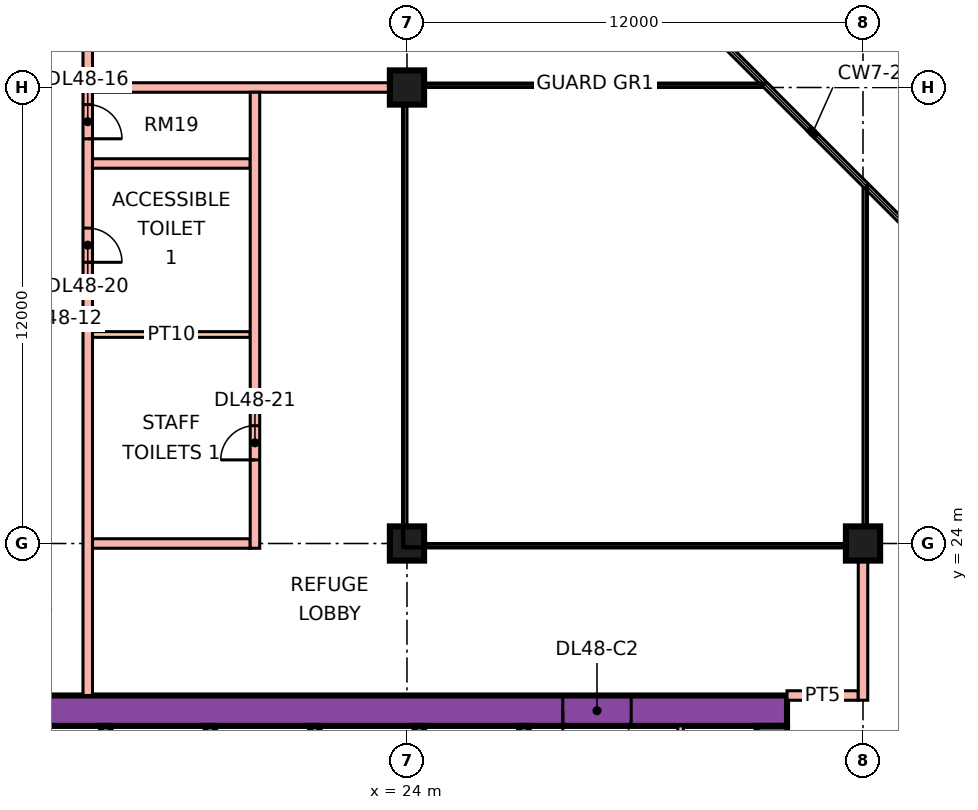
"""IFC4 building model, lengths in metres.
Left out: names, types, materials, properties, quantities, classifications, styles, units other than length and angle.
Written with IfcOpenShell. Run it as: python <this file> out.ifc"""

import sys

from ifc_helpers import new_model, si_unit, direction, frame, frame_2d, origin, origin_2d, place, context, subcontext, project, spatial, rectangle, extrude, element, fill, save


model = new_model("IFC4")
c1 = context("Model", 3, precision=1e-05, world=origin(), true_north=direction((0.0, 1.0)))
c2 = subcontext(c1, "Body", "Model", "MODEL_VIEW")
j1 = project(units=[si_unit("LENGTHUNIT", "METRE"), si_unit("PLANEANGLEUNIT", "RADIAN")], contexts=[c1])
p1 = place(None, origin())
s1 = spatial("IfcSite", under=j1, at=p1, CompositionType="ELEMENT")
p2 = place(p1, origin())
s2 = spatial("IfcBuilding", under=s1, at=p2, CompositionType="ELEMENT")
p3 = place(p2, frame((0.0, 0.0, 206.15)))
s3 = spatial("IfcBuildingStorey", under=s2, at=p3, CompositionType="ELEMENT", Elevation=206.15)
for number, where, z_axis, x_axis in (
    (1, (24.0, 24.0, 0.0), (0.0, 0.0, 1.0), (1.0, 0.0, 0.0)),
    (2, (24.0, 36.0, 0.0), (0.0, 0.0, 1.0), (1.0, 0.0, 0.0)),
    (3, (36.0, 24.0, 0.0), (0.0, 0.0, 1.0), (1.0, 0.0, 0.0)),
):
    element("IfcColumn", number, at=place(p3, frame(where, z_axis=z_axis, x_axis=x_axis)), inside=s3, PredefinedType="COLUMN", context=c2, shape_type="SweptSolid", body=[
        extrude(rectangle(XDim=0.9, YDim=0.9, at=origin_2d()), origin(), (0.0, 0.0, 1.0), 5.5),
    ])
p4 = place(p3, frame((9.0, 19.6, 0.0), z_axis=(0.0, 0.0, 1.0), x_axis=(1.0, 0.0, 0.0)))
e4 = element("IfcWall", 4, at=p4, inside=s3, PredefinedType="SHEAR", context=c2, shape_type="SweptSolid", body=[
    extrude(rectangle(XDim=25.0, YDim=0.8, at=frame_2d((12.5, 0.0))), origin(), (0.0, 0.0, 1.0), 5.5),
])
p5 = place(p4, frame((19.1, 0.0, 0.0)))
e5 = element("IfcOpeningElement", 5, at=p5, cuts=e4, PredefinedType="OPENING", context=c2, shape_type="SweptSolid", body=[
    extrude(rectangle(XDim=1.8, YDim=2.4, at=frame_2d((0.9, 1.2))), frame((0.0, 0.41, 0.0), z_axis=(0.0, -1.0, 0.0), x_axis=(1.0, 0.0, 0.0)), (0.0, 0.0, 1.0), 0.82),
])
p6 = place(p3, frame((33.6, 7.8, 0.0), z_axis=(0.0, 0.0, 1.0), x_axis=(0.0, 1.0, 0.0)))
e6 = element("IfcWall", 6, at=p6, inside=s3, PredefinedType="SHEAR", context=c2, shape_type="SweptSolid", body=[
    extrude(rectangle(XDim=11.4, YDim=0.8, at=frame_2d((5.7, 0.0))), origin(), (0.0, 0.0, 1.0), 5.5),
])
p7 = place(p6, frame((5.4, 0.0, 0.0)))
e7 = element("IfcOpeningElement", 7, at=p7, cuts=e6, PredefinedType="OPENING", context=c2, shape_type="SweptSolid", body=[
    extrude(rectangle(XDim=1.8, YDim=2.4, at=frame_2d((0.9, 1.2))), frame((0.0, 0.41, 0.0), z_axis=(0.0, -1.0, 0.0), x_axis=(1.0, 0.0, 0.0)), (0.0, 0.0, 1.0), 0.82),
])
for number, where, z_axis, x_axis in (
    (8, (16.075, 15.8, 0.0), (0.0, 0.0, 1.0), (0.0, 1.0, 0.0)),
    (9, (18.825, 15.8, 0.0), (0.0, 0.0, 1.0), (0.0, 1.0, 0.0)),
    (10, (21.575, 15.8, 0.0), (0.0, 0.0, 1.0), (0.0, 1.0, 0.0)),
    (11, (24.325, 15.8, 0.0), (0.0, 0.0, 1.0), (0.0, 1.0, 0.0)),
    (12, (27.075, 15.8, 0.0), (0.0, 0.0, 1.0), (0.0, 1.0, 0.0)),
):
    element("IfcWall", number, at=place(p3, frame(where, z_axis=z_axis, x_axis=x_axis)), inside=s3, PredefinedType="SHEAR", context=c2, shape_type="SweptSolid", body=[
        extrude(rectangle(XDim=3.4, YDim=0.25, at=frame_2d((1.7, 0.0))), origin(), (0.0, 0.0, 1.0), 5.5),
    ])
p8 = place(p3, frame((31.2, 16.0, 0.0), z_axis=(0.0, 0.0, 1.0), x_axis=(0.0, 1.0, 0.0)))
e13 = element("IfcWall", 13, at=p8, inside=s3, PredefinedType="PARTITIONING", context=c2, shape_type="SweptSolid", body=[
    extrude(rectangle(XDim=3.2, YDim=0.15, at=frame_2d((1.6, 0.0))), origin(), (0.0, 0.0, 1.0), 5.1),
])
p9 = place(p8, frame((0.5, 0.0, 0.0)))
e14 = element("IfcOpeningElement", 14, at=p9, cuts=e13, PredefinedType="OPENING", context=c2, shape_type="SweptSolid", body=[
    extrude(rectangle(XDim=0.9, YDim=2.1, at=frame_2d((0.45, 1.05))), frame((0.0, 0.085, 0.0), z_axis=(0.0, -1.0, 0.0), x_axis=(1.0, 0.0, 0.0)), (0.0, 0.0, 1.0), 0.17),
])
p10 = place(p3, frame((15.6, 20.0, 0.0), z_axis=(0.0, 0.0, 1.0), x_axis=(0.0, 1.0, 0.0)))
e15 = element("IfcWall", 15, at=p10, inside=s3, PredefinedType="PARTITIONING", context=c2, shape_type="SweptSolid", body=[
    extrude(rectangle(XDim=27.775, YDim=0.25, at=frame_2d((13.887, 0.0))), origin(), (0.0, 0.0, 1.0), 5.1),
])
p11 = place(p10, frame((17.15, 0.0, 0.0)))
e16 = element("IfcOpeningElement", 16, at=p11, cuts=e15, PredefinedType="OPENING", context=c2, shape_type="SweptSolid", body=[
    extrude(rectangle(XDim=1.8, YDim=2.1, at=frame_2d((0.9, 1.05))), frame((0.0, 0.135, 0.0), z_axis=(0.0, -1.0, 0.0), x_axis=(1.0, 0.0, 0.0)), (0.0, 0.0, 1.0), 0.27),
])
p12 = place(p10, frame((22.15, 0.0, 0.0)))
e17 = element("IfcOpeningElement", 17, at=p12, cuts=e15, PredefinedType="OPENING", context=c2, shape_type="SweptSolid", body=[
    extrude(rectangle(XDim=1.8, YDim=2.1, at=frame_2d((0.9, 1.05))), frame((0.0, 0.135, 0.0), z_axis=(0.0, -1.0, 0.0), x_axis=(1.0, 0.0, 0.0)), (0.0, 0.0, 1.0), 0.27),
])
p13 = place(p10, frame((26.4, 0.0, 0.0)))
e18 = element("IfcOpeningElement", 18, at=p13, cuts=e15, PredefinedType="OPENING", context=c2, shape_type="SweptSolid", body=[
    extrude(rectangle(XDim=1.2, YDim=2.1, at=frame_2d((0.6, 1.05))), frame((0.0, 0.135, 0.0), z_axis=(0.0, -1.0, 0.0), x_axis=(1.0, 0.0, 0.0)), (0.0, 0.0, 1.0), 0.27),
])
p14 = place(p10, frame((14.65, 0.0, 0.0)))
e19 = element("IfcOpeningElement", 19, at=p14, cuts=e15, PredefinedType="OPENING", context=c2, shape_type="SweptSolid", body=[
    extrude(rectangle(XDim=0.9, YDim=2.1, at=frame_2d((0.45, 1.05))), frame((0.0, 0.135, 0.0), z_axis=(0.0, -1.0, 0.0), x_axis=(1.0, 0.0, 0.0)), (0.0, 0.0, 1.0), 0.27),
])
p15 = place(p10, frame((11.4, 0.0, 0.0)))
e20 = element("IfcOpeningElement", 20, at=p15, cuts=e15, PredefinedType="OPENING", context=c2, shape_type="SweptSolid", body=[
    extrude(rectangle(XDim=0.9, YDim=2.1, at=frame_2d((0.45, 1.05))), frame((0.0, 0.135, 0.0), z_axis=(0.0, -1.0, 0.0), x_axis=(1.0, 0.0, 0.0)), (0.0, 0.0, 1.0), 0.27),
])
p16 = place(p3, frame((15.725, 24.0, 0.0), z_axis=(0.0, 0.0, 1.0), x_axis=(1.0, 0.0, 0.0)))
e21 = element("IfcWall", 21, at=p16, inside=s3, PredefinedType="PARTITIONING", context=c2, shape_type="SweptSolid", body=[
    extrude(rectangle(XDim=4.15, YDim=0.25, at=frame_2d((2.075, 0.0))), origin(), (0.0, 0.0, 1.0), 5.1),
])
p17 = place(p3, frame((15.725, 29.5, 0.0), z_axis=(0.0, 0.0, 1.0), x_axis=(1.0, 0.0, 0.0)))
e22 = element("IfcWall", 22, at=p17, inside=s3, PredefinedType="PARTITIONING", context=c2, shape_type="SweptSolid", body=[
    extrude(rectangle(XDim=4.15, YDim=0.15, at=frame_2d((2.075, 0.0))), origin(), (0.0, 0.0, 1.0), 5.1),
])
p18 = place(p3, frame((15.725, 34.0, 0.0), z_axis=(0.0, 0.0, 1.0), x_axis=(1.0, 0.0, 0.0)))
e23 = element("IfcWall", 23, at=p18, inside=s3, PredefinedType="PARTITIONING", context=c2, shape_type="SweptSolid", body=[
    extrude(rectangle(XDim=4.15, YDim=0.25, at=frame_2d((2.075, 0.0))), origin(), (0.0, 0.0, 1.0), 5.1),
])
p19 = place(p3, frame((15.725, 36.0, 0.0), z_axis=(0.0, 0.0, 1.0), x_axis=(1.0, 0.0, 0.0)))
e24 = element("IfcWall", 24, at=p19, inside=s3, PredefinedType="PARTITIONING", context=c2, shape_type="SweptSolid", body=[
    extrude(rectangle(XDim=8.275, YDim=0.25, at=frame_2d((4.137, 0.0))), origin(), (0.0, 0.0, 1.0), 5.1),
])
p20 = place(p3, frame((20.0, 23.875, 0.0), z_axis=(0.0, 0.0, 1.0), x_axis=(0.0, 1.0, 0.0)))
e25 = element("IfcWall", 25, at=p20, inside=s3, PredefinedType="PARTITIONING", context=c2, shape_type="SweptSolid", body=[
    extrude(rectangle(XDim=12.0, YDim=0.25, at=frame_2d((6.0, 0.0))), origin(), (0.0, 0.0, 1.0), 5.1),
])
p21 = place(p20, frame((2.325, 0.0, 0.0)))
e26 = element("IfcOpeningElement", 26, at=p21, cuts=e25, PredefinedType="OPENING", context=c2, shape_type="SweptSolid", body=[
    extrude(rectangle(XDim=0.9, YDim=2.1, at=frame_2d((0.45, 1.05))), frame((0.0, 0.135, 0.0), z_axis=(0.0, -1.0, 0.0), x_axis=(1.0, 0.0, 0.0)), (0.0, 0.0, 1.0), 0.27),
])
p22 = place(p3, frame((34.0, 20.0, 0.0), z_axis=(0.0, 0.0, 1.0), x_axis=(1.0, 0.0, 0.0)))
e27 = element("IfcWall", 27, at=p22, inside=s3, PredefinedType="PARTITIONING", context=c2, shape_type="SweptSolid", body=[
    extrude(rectangle(XDim=1.875, YDim=0.25, at=frame_2d((0.938, 0.0))), origin(), (0.0, 0.0, 1.0), 5.1),
])
p23 = place(p3, frame((36.0, 19.875, 0.0), z_axis=(0.0, 0.0, 1.0), x_axis=(0.0, 1.0, 0.0)))
e28 = element("IfcWall", 28, at=p23, inside=s3, PredefinedType="PARTITIONING", context=c2, shape_type="SweptSolid", body=[
    extrude(rectangle(XDim=4.125, YDim=0.25, at=frame_2d((2.062, 0.0))), origin(), (0.0, 0.0, 1.0), 5.1),
])
p24 = place(p5, frame((1.8, 0.0, 0.0), z_axis=(0.0, 0.0, 1.0), x_axis=(-1.0, 0.0, 0.0)))
e29 = element("IfcDoor", 29, at=p24, inside=s3, OperationType="DOUBLE_DOOR_SINGLE_SWING", PredefinedType="DOOR", context=c2, shape_type="SweptSolid", body=[
    extrude(rectangle(XDim=1.8, YDim=2.4, at=frame_2d((0.9, 1.2))), frame((0.0, 0.025, 0.0), z_axis=(0.0, -1.0, 0.0), x_axis=(1.0, 0.0, 0.0)), (0.0, 0.0, 1.0), 0.05),
])
fill(e5, e29)
p25 = place(p14, frame((0.9, 0.0, 0.0), z_axis=(0.0, 0.0, 1.0), x_axis=(-1.0, 0.0, 0.0)))
e30 = element("IfcDoor", 30, at=p25, inside=s3, OperationType="SINGLE_SWING_LEFT", PredefinedType="DOOR", context=c2, shape_type="SweptSolid", body=[
    extrude(rectangle(XDim=0.9, YDim=2.1, at=frame_2d((0.45, 1.05))), frame((0.0, 0.025, 0.0), z_axis=(0.0, -1.0, 0.0), x_axis=(1.0, 0.0, 0.0)), (0.0, 0.0, 1.0), 0.05),
])
fill(e19, e30)
p26 = place(p15, frame((0.9, 0.0, 0.0), z_axis=(0.0, 0.0, 1.0), x_axis=(-1.0, 0.0, 0.0)))
e31 = element("IfcDoor", 31, at=p26, inside=s3, OperationType="SINGLE_SWING_LEFT", PredefinedType="DOOR", context=c2, shape_type="SweptSolid", body=[
    extrude(rectangle(XDim=0.9, YDim=2.1, at=frame_2d((0.45, 1.05))), frame((0.0, 0.025, 0.0), z_axis=(0.0, -1.0, 0.0), x_axis=(1.0, 0.0, 0.0)), (0.0, 0.0, 1.0), 0.05),
])
fill(e20, e31)
p27 = place(p21, origin())
e32 = element("IfcDoor", 32, at=p27, inside=s3, OperationType="SINGLE_SWING_LEFT", PredefinedType="DOOR", context=c2, shape_type="SweptSolid", body=[
    extrude(rectangle(XDim=0.9, YDim=2.1, at=frame_2d((0.45, 1.05))), frame((0.0, 0.025, 0.0), z_axis=(0.0, -1.0, 0.0), x_axis=(1.0, 0.0, 0.0)), (0.0, 0.0, 1.0), 0.05),
])
fill(e26, e32)
save(model, sys.argv[1])
